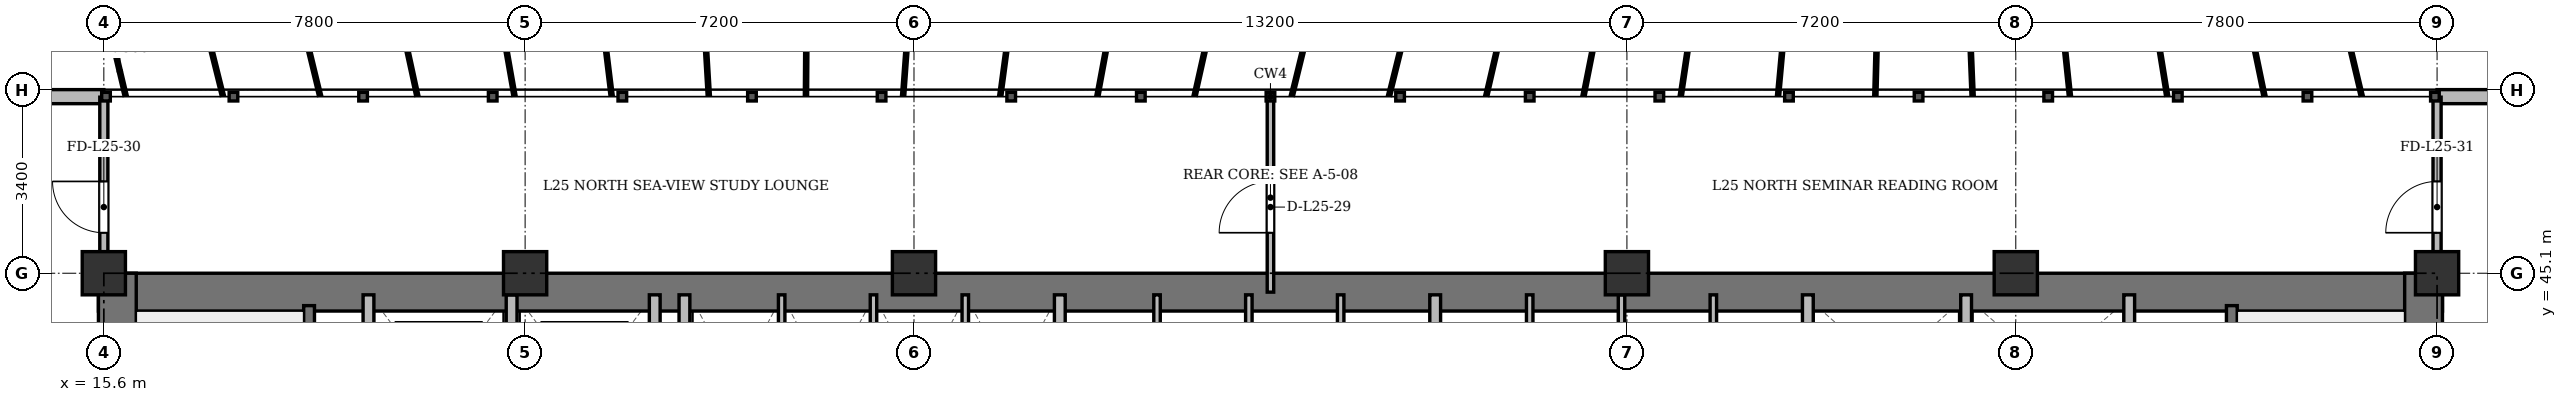
"""IFC4 building model, lengths in metres.
Left out: names, types, materials, properties, quantities, classifications, styles, units other than length and angle.
Written with IfcOpenShell. Run it as: python <this file> out.ifc"""

import sys

from ifc_helpers import new_model, si_unit, direction, frame, frame_2d, origin, origin_2d, place, context, subcontext, project, spatial, rectangle, extrude, source, transform, mapped, element, fill, save


model = new_model("IFC4")
c1 = context("Model", 3, precision=1e-05, world=origin(), true_north=direction((0.0, 1.0)))
c2 = subcontext(c1, "Body", "Model", "MODEL_VIEW")
j1 = project(units=[si_unit("LENGTHUNIT", "METRE"), si_unit("PLANEANGLEUNIT", "RADIAN")], contexts=[c1])
p1 = place(None, origin())
s1 = spatial("IfcSite", under=j1, at=p1, CompositionType="ELEMENT")
p2 = place(p1, origin())
s2 = spatial("IfcBuilding", under=s1, at=p2, CompositionType="ELEMENT")
p3 = place(p2, frame((0.0, 0.0, 99.7)))
s3 = spatial("IfcBuildingStorey", under=s2, at=p3, CompositionType="ELEMENT", Elevation=99.7)
m1 = source(origin(), c2, "Body", "SweptSolid", [
    extrude(rectangle(XDim=0.8, YDim=0.8, at=origin_2d()), origin(), (0.0, 0.0, 1.0), 3.6),
])
for number, where, z_axis, x_axis in (
    (1, (15.6, 45.1, 0.0), (0.0, 0.0, 1.0), (1.0, 0.0, 0.0)),
    (2, (23.4, 45.1, 0.0), (0.0, 0.0, 1.0), (1.0, 0.0, 0.0)),
    (3, (30.6, 45.1, 0.0), (0.0, 0.0, 1.0), (1.0, 0.0, 0.0)),
    (4, (43.8, 45.1, 0.0), (0.0, 0.0, 1.0), (1.0, 0.0, 0.0)),
    (5, (51.0, 45.1, 0.0), (0.0, 0.0, 1.0), (1.0, 0.0, 0.0)),
    (6, (58.8, 45.1, 0.0), (0.0, 0.0, 1.0), (1.0, 0.0, 0.0)),
):
    element("IfcColumn", number, at=place(p3, frame(where, z_axis=z_axis, x_axis=x_axis)), inside=s3, PredefinedType="COLUMN", context=c2, shape_type="MappedRepresentation", body=[
        mapped(m1, transform((0.0, 0.0, 0.0), x_axis=(1.0, 0.0, 0.0), y_axis=(0.0, 1.0, 0.0), z_axis=(0.0, 0.0, 1.0), scale=1.0)),
    ])
p4 = place(p3, frame((7.6, 48.37, 0.0), z_axis=(0.0, 0.0, 1.0), x_axis=(1.0, 0.0, 0.0)))
e7 = element("IfcWall", 7, at=p4, inside=s3, PredefinedType="SOLIDWALL", context=c2, shape_type="SweptSolid", body=[
    extrude(rectangle(XDim=8.0, YDim=0.26, at=frame_2d((4.0, 0.0))), origin(), (0.0, 0.0, 1.0), 3.34),
])
p5 = place(p4, frame((0.768, 0.0, 0.9)))
e8 = element("IfcOpeningElement", 8, at=p5, cuts=e7, PredefinedType="OPENING", context=c2, shape_type="SweptSolid", body=[
    extrude(rectangle(XDim=1.2, YDim=1.65, at=frame_2d((0.6, 0.825))), frame((0.0, 0.14, 0.0), z_axis=(0.0, -1.0, 0.0), x_axis=(1.0, 0.0, 0.0)), (0.0, 0.0, 1.0), 0.28),
])
p6 = place(p4, frame((4.441, 0.0, 0.9)))
e9 = element("IfcOpeningElement", 9, at=p6, cuts=e7, PredefinedType="OPENING", context=c2, shape_type="SweptSolid", body=[
    extrude(rectangle(XDim=1.35, YDim=1.5, at=frame_2d((0.675, 0.75))), frame((0.0, 0.14, 0.0), z_axis=(0.0, -1.0, 0.0), x_axis=(1.0, 0.0, 0.0)), (0.0, 0.0, 1.0), 0.28),
])
p7 = place(p3, frame((58.8, 48.37, 0.0), z_axis=(0.0, 0.0, 1.0), x_axis=(1.0, 0.0, 0.0)))
e10 = element("IfcWall", 10, at=p7, inside=s3, PredefinedType="SOLIDWALL", context=c2, shape_type="SweptSolid", body=[
    extrude(rectangle(XDim=8.0, YDim=0.26, at=frame_2d((4.0, 0.0))), origin(), (0.0, 0.0, 1.0), 3.34),
])
p8 = place(p7, frame((3.325, 0.0, 0.9)))
e11 = element("IfcOpeningElement", 11, at=p8, cuts=e10, PredefinedType="OPENING", context=c2, shape_type="SweptSolid", body=[
    extrude(rectangle(XDim=1.35, YDim=1.5, at=frame_2d((0.675, 0.75))), frame((0.0, 0.14, 0.0), z_axis=(0.0, -1.0, 0.0), x_axis=(1.0, 0.0, 0.0)), (0.0, 0.0, 1.0), 0.28),
])
p9 = place(p3, frame((15.5, 44.75, 0.0), z_axis=(0.0, 0.0, 1.0), x_axis=(1.0, 0.0, 0.0)))
e12 = element("IfcWall", 12, at=p9, inside=s3, PredefinedType="SHEAR", context=c2, shape_type="SweptSolid", body=[
    extrude(rectangle(XDim=43.4, YDim=0.7, at=frame_2d((21.7, 0.0))), origin(), (0.0, 0.0, 1.0), 3.34),
])
for number, where, z_axis, x_axis in (
    (13, (15.85, 33.4, 0.0), (0.0, 0.0, 1.0), (0.0, 1.0, 0.0)),
    (14, (58.55, 33.4, 0.0), (0.0, 0.0, 1.0), (0.0, 1.0, 0.0)),
):
    element("IfcWall", number, at=place(p3, frame(where, z_axis=z_axis, x_axis=x_axis)), inside=s3, PredefinedType="SHEAR", context=c2, shape_type="SweptSolid", body=[
        extrude(rectangle(XDim=11.7, YDim=0.7, at=frame_2d((5.85, 0.0))), origin(), (0.0, 0.0, 1.0), 3.34),
    ])
p10 = place(p3, frame((19.4, 33.4, 0.0), z_axis=(0.0, 0.0, 1.0), x_axis=(0.0, 1.0, 0.0)))
e15 = element("IfcWall", 15, at=p10, inside=s3, PredefinedType="SHEAR", context=c2, shape_type="SweptSolid", body=[
    extrude(rectangle(XDim=11.1, YDim=0.2, at=frame_2d((5.55, 0.0))), origin(), (0.0, 0.0, 1.0), 3.34),
])
p11 = place(p10, frame((0.85, 0.0, 0.0)))
e16 = element("IfcOpeningElement", 16, at=p11, cuts=e15, PredefinedType="OPENING", context=c2, shape_type="SweptSolid", body=[
    extrude(rectangle(XDim=1.1, YDim=2.15, at=frame_2d((0.55, 1.075))), frame((0.0, 0.11, 0.0), z_axis=(0.0, -1.0, 0.0), x_axis=(1.0, 0.0, 0.0)), (0.0, 0.0, 1.0), 0.22),
])
p12 = place(p3, frame((55.0, 33.4, 0.0), z_axis=(0.0, 0.0, 1.0), x_axis=(0.0, 1.0, 0.0)))
e17 = element("IfcWall", 17, at=p12, inside=s3, PredefinedType="SHEAR", context=c2, shape_type="SweptSolid", body=[
    extrude(rectangle(XDim=11.1, YDim=0.2, at=frame_2d((5.55, 0.0))), origin(), (0.0, 0.0, 1.0), 3.34),
])
p13 = place(p12, frame((0.85, 0.0, 0.0)))
e18 = element("IfcOpeningElement", 18, at=p13, cuts=e17, PredefinedType="OPENING", context=c2, shape_type="SweptSolid", body=[
    extrude(rectangle(XDim=1.1, YDim=2.15, at=frame_2d((0.55, 1.075))), frame((0.0, 0.11, 0.0), z_axis=(0.0, -1.0, 0.0), x_axis=(1.0, 0.0, 0.0)), (0.0, 0.0, 1.0), 0.22),
])
for number, where, z_axis, x_axis in (
    (19, (20.5, 41.3, 0.0), (0.0, 0.0, 1.0), (0.0, 1.0, 0.0)),
    (20, (23.15, 41.3, 0.0), (0.0, 0.0, 1.0), (0.0, 1.0, 0.0)),
    (21, (25.8, 41.3, 0.0), (0.0, 0.0, 1.0), (0.0, 1.0, 0.0)),
):
    element("IfcWall", number, at=place(p3, frame(where, z_axis=z_axis, x_axis=x_axis)), inside=s3, PredefinedType="SOLIDWALL", context=c2, shape_type="SweptSolid", body=[
        extrude(rectangle(XDim=3.4, YDim=0.2, at=frame_2d((1.7, 0.0))), origin(), (0.0, 0.0, 1.0), 3.34),
    ])
p14 = place(p3, frame((26.35, 33.4, 0.0), z_axis=(0.0, 0.0, 1.0), x_axis=(0.0, 1.0, 0.0)))
e22 = element("IfcWall", 22, at=p14, inside=s3, PredefinedType="SOLIDWALL", context=c2, shape_type="SweptSolid", body=[
    extrude(rectangle(XDim=11.3, YDim=0.2, at=frame_2d((5.65, 0.0))), origin(), (0.0, 0.0, 1.0), 2.752),
])
p15 = place(p3, frame((33.3, 41.5, 0.0), z_axis=(0.0, 0.0, 1.0), x_axis=(0.0, 1.0, 0.0)))
e23 = element("IfcWall", 23, at=p15, inside=s3, PredefinedType="SOLIDWALL", context=c2, shape_type="SweptSolid", body=[
    extrude(rectangle(XDim=3.2, YDim=0.2, at=frame_2d((1.6, 0.0))), origin(), (0.0, 0.0, 1.0), 3.34),
])
for number, where, z_axis, x_axis in (
    (24, (28.15, 41.5, 0.0), (0.0, 0.0, 1.0), (0.0, 1.0, 0.0)),
    (25, (29.85, 41.5, 0.0), (0.0, 0.0, 1.0), (0.0, 1.0, 0.0)),
    (26, (31.55, 41.5, 0.0), (0.0, 0.0, 1.0), (0.0, 1.0, 0.0)),
    (27, (35.1, 41.5, 0.0), (0.0, 0.0, 1.0), (0.0, 1.0, 0.0)),
    (28, (36.8, 41.5, 0.0), (0.0, 0.0, 1.0), (0.0, 1.0, 0.0)),
    (29, (38.5, 41.5, 0.0), (0.0, 0.0, 1.0), (0.0, 1.0, 0.0)),
):
    element("IfcWall", number, at=place(p3, frame(where, z_axis=z_axis, x_axis=x_axis)), inside=s3, PredefinedType="PARTITIONING", context=c2, shape_type="SweptSolid", body=[
        extrude(rectangle(XDim=3.2, YDim=0.12, at=frame_2d((1.6, 0.0))), origin(), (0.0, 0.0, 1.0), 3.34),
    ])
p16 = place(p3, frame((40.25, 41.5, 0.0), z_axis=(0.0, 0.0, 1.0), x_axis=(0.0, 1.0, 0.0)))
e30 = element("IfcWall", 30, at=p16, inside=s3, PredefinedType="SOLIDWALL", context=c2, shape_type="SweptSolid", body=[
    extrude(rectangle(XDim=3.2, YDim=0.2, at=frame_2d((1.6, 0.0))), origin(), (0.0, 0.0, 1.0), 3.34),
])
p17 = place(p3, frame((42.0, 41.5, 0.0), z_axis=(0.0, 0.0, 1.0), x_axis=(0.0, 1.0, 0.0)))
e31 = element("IfcWall", 31, at=p17, inside=s3, PredefinedType="PARTITIONING", context=c2, shape_type="SweptSolid", body=[
    extrude(rectangle(XDim=3.2, YDim=0.12, at=frame_2d((1.6, 0.0))), origin(), (0.0, 0.0, 1.0), 3.34),
])
p18 = place(p3, frame((43.7, 41.5, 0.0), z_axis=(0.0, 0.0, 1.0), x_axis=(0.0, 1.0, 0.0)))
e32 = element("IfcWall", 32, at=p18, inside=s3, PredefinedType="PARTITIONING", context=c2, shape_type="SweptSolid", body=[
    extrude(rectangle(XDim=3.2, YDim=0.12, at=frame_2d((1.6, 0.0))), origin(), (0.0, 0.0, 1.0), 2.84),
])
p19 = place(p3, frame((45.4, 41.5, 0.0), z_axis=(0.0, 0.0, 1.0), x_axis=(0.0, 1.0, 0.0)))
e33 = element("IfcWall", 33, at=p19, inside=s3, PredefinedType="PARTITIONING", context=c2, shape_type="SweptSolid", body=[
    extrude(rectangle(XDim=3.2, YDim=0.12, at=frame_2d((1.6, 0.0))), origin(), (0.0, 0.0, 1.0), 3.34),
])
p20 = place(p3, frame((47.15, 33.4, 0.0), z_axis=(0.0, 0.0, 1.0), x_axis=(0.0, 1.0, 0.0)))
e34 = element("IfcWall", 34, at=p20, inside=s3, PredefinedType="SOLIDWALL", context=c2, shape_type="SweptSolid", body=[
    extrude(rectangle(XDim=11.3, YDim=0.2, at=frame_2d((5.65, 0.0))), origin(), (0.0, 0.0, 1.0), 2.752),
])
for number, where, z_axis, x_axis in (
    (35, (50.08, 42.05, 0.0), (0.0, 0.0, 1.0), (0.0, 1.0, 0.0)),
    (36, (53.1, 42.05, 0.0), (0.0, 0.0, 1.0), (0.0, 1.0, 0.0)),
):
    element("IfcWall", number, at=place(p3, frame(where, z_axis=z_axis, x_axis=x_axis)), inside=s3, PredefinedType="SOLIDWALL", context=c2, shape_type="SweptSolid", body=[
        extrude(rectangle(XDim=2.65, YDim=0.2, at=frame_2d((1.325, 0.0))), origin(), (0.0, 0.0, 1.0), 3.34),
    ])
p21 = place(p3, frame((37.2, 44.75, 0.0), z_axis=(0.0, 0.0, 1.0), x_axis=(0.0, 1.0, 0.0)))
e37 = element("IfcWall", 37, at=p21, inside=s3, PredefinedType="PARTITIONING", context=c2, shape_type="SweptSolid", body=[
    extrude(rectangle(XDim=3.61, YDim=0.12, at=frame_2d((1.805, 0.0))), origin(), (0.0, 0.0, 1.0), 2.752),
])
p22 = place(p21, frame((1.1, 0.0, 0.0)))
e38 = element("IfcOpeningElement", 38, at=p22, cuts=e37, PredefinedType="OPENING", context=c2, shape_type="SweptSolid", body=[
    extrude(rectangle(XDim=0.95, YDim=2.15, at=frame_2d((0.475, 1.075))), frame((0.0, 0.07, 0.0), z_axis=(0.0, -1.0, 0.0), x_axis=(1.0, 0.0, 0.0)), (0.0, 0.0, 1.0), 0.14),
])
p23 = place(p3, frame((15.6, 44.75, 0.0), z_axis=(0.0, 0.0, 1.0), x_axis=(0.0, 1.0, 0.0)))
e39 = element("IfcWall", 39, at=p23, inside=s3, PredefinedType="PARTITIONING", context=c2, shape_type="SweptSolid", body=[
    extrude(rectangle(XDim=3.61, YDim=0.15, at=frame_2d((1.805, 0.0))), origin(), (0.0, 0.0, 1.0), 2.84),
])
p24 = place(p23, frame((1.1, 0.0, 0.0)))
e40 = element("IfcOpeningElement", 40, at=p24, cuts=e39, PredefinedType="OPENING", context=c2, shape_type="SweptSolid", body=[
    extrude(rectangle(XDim=0.95, YDim=2.15, at=frame_2d((0.475, 1.075))), frame((0.0, 0.085, 0.0), z_axis=(0.0, -1.0, 0.0), x_axis=(1.0, 0.0, 0.0)), (0.0, 0.0, 1.0), 0.17),
])
p25 = place(p3, frame((58.8, 44.75, 0.0), z_axis=(0.0, 0.0, 1.0), x_axis=(0.0, 1.0, 0.0)))
e41 = element("IfcWall", 41, at=p25, inside=s3, PredefinedType="PARTITIONING", context=c2, shape_type="SweptSolid", body=[
    extrude(rectangle(XDim=3.61, YDim=0.15, at=frame_2d((1.805, 0.0))), origin(), (0.0, 0.0, 1.0), 2.84),
])
p26 = place(p25, frame((1.1, 0.0, 0.0)))
e42 = element("IfcOpeningElement", 42, at=p26, cuts=e41, PredefinedType="OPENING", context=c2, shape_type="SweptSolid", body=[
    extrude(rectangle(XDim=0.95, YDim=2.15, at=frame_2d((0.475, 1.075))), frame((0.0, 0.085, 0.0), z_axis=(0.0, -1.0, 0.0), x_axis=(1.0, 0.0, 0.0)), (0.0, 0.0, 1.0), 0.17),
])
m2 = source(origin(), c2, "Body", "SweptSolid", [
    extrude(rectangle(XDim=0.95, YDim=2.15, at=frame_2d((0.475, 1.075))), frame((0.0, 0.025, 0.0), z_axis=(0.0, -1.0, 0.0), x_axis=(1.0, 0.0, 0.0)), (0.0, 0.0, 1.0), 0.05),
])
p27 = place(p22, origin())
e43 = element("IfcDoor", 43, at=p27, inside=s3, OperationType="SINGLE_SWING_LEFT", PredefinedType="DOOR", context=c2, shape_type="MappedRepresentation", body=[
    mapped(m2, transform((0.0, 0.0, 0.0), x_axis=(1.0, 0.0, 0.0), y_axis=(0.0, 1.0, 0.0), z_axis=(0.0, 0.0, 1.0), scale=1.0)),
])
fill(e38, e43)
p28 = place(p24, origin())
e44 = element("IfcDoor", 44, at=p28, inside=s3, OperationType="SINGLE_SWING_RIGHT", PredefinedType="DOOR", context=c2, shape_type="MappedRepresentation", body=[
    mapped(m2, transform((0.0, 0.0, 0.0), x_axis=(1.0, 0.0, 0.0), y_axis=(0.0, 1.0, 0.0), z_axis=(0.0, 0.0, 1.0), scale=1.0)),
])
fill(e40, e44)
p29 = place(p26, origin())
e45 = element("IfcDoor", 45, at=p29, inside=s3, OperationType="SINGLE_SWING_LEFT", PredefinedType="DOOR", context=c2, shape_type="MappedRepresentation", body=[
    mapped(m2, transform((0.0, 0.0, 0.0), x_axis=(1.0, 0.0, 0.0), y_axis=(0.0, 1.0, 0.0), z_axis=(0.0, 0.0, 1.0), scale=1.0)),
])
fill(e42, e45)
save(model, sys.argv[1])
